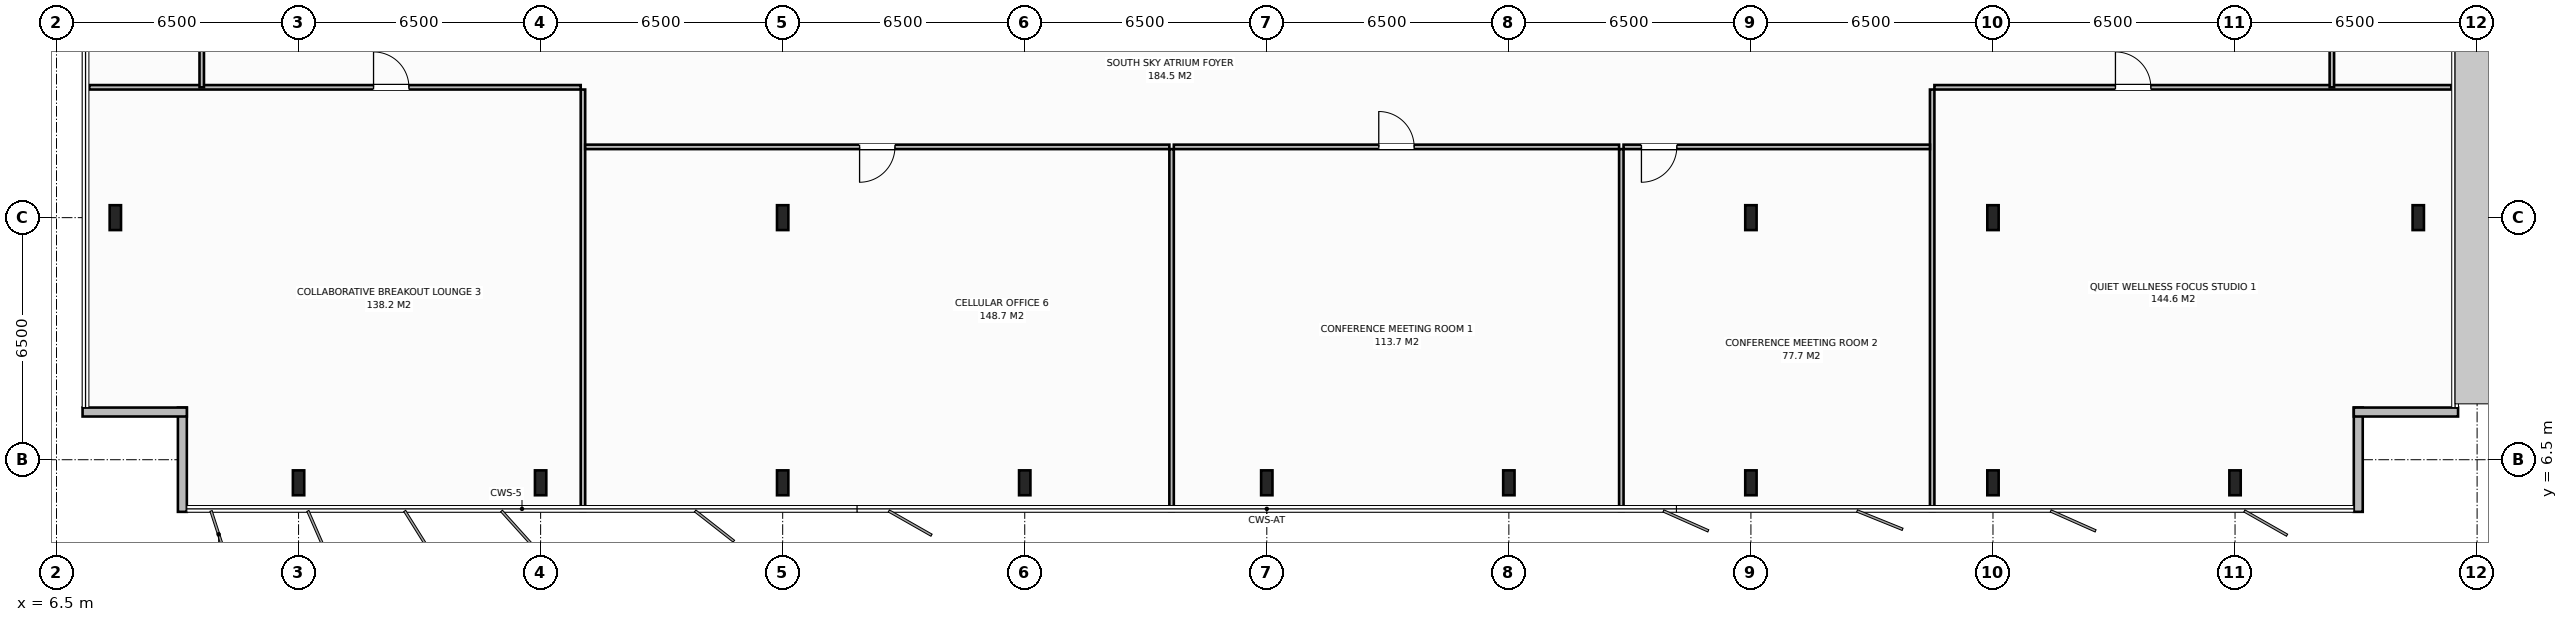
"""IFC4 building model, lengths in metres.
Left out: names, types, materials, properties, quantities, classifications, styles, units other than length and angle.
Written with IfcOpenShell. Run it as: python <this file> out.ifc"""

import sys

from ifc_helpers import new_model, si_unit, direction, frame, frame_2d, origin, origin_2d, place, context, subcontext, project, spatial, rectangle, i_section, extrude, element, fill, save


model = new_model("IFC4")
c1 = context("Model", 3, precision=1e-05, world=origin(), true_north=direction((0.0, 1.0)))
c2 = subcontext(c1, "Body", "Model", "MODEL_VIEW")
j1 = project(units=[si_unit("LENGTHUNIT", "METRE"), si_unit("PLANEANGLEUNIT", "RADIAN")], contexts=[c1])
p1 = place(None, origin())
s1 = spatial("IfcSite", under=j1, at=p1, CompositionType="ELEMENT")
p2 = place(p1, origin())
s2 = spatial("IfcBuilding", under=s1, at=p2, CompositionType="ELEMENT")
p3 = place(p2, frame((0.0, 0.0, 263.2)))
s3 = spatial("IfcBuildingStorey", under=s2, at=p3, CompositionType="ELEMENT", Elevation=263.2)
for number, where, z_axis, x_axis in (
    (1, (58.5, 13.0, 0.0), (0.0, 0.0, 1.0), (1.0, 0.0, 0.0)),
    (2, (26.0, 13.0, 0.0), (0.0, 0.0, 1.0), (1.0, 0.0, 0.0)),
    (3, (52.0, 13.0, 0.0), (0.0, 0.0, 1.0), (1.0, 0.0, 0.0)),
    (4, (13.0, 5.88, 0.0), (0.0, 0.0, 1.0), (1.0, 0.0, 0.0)),
    (5, (19.5, 5.88, 0.0), (0.0, 0.0, 1.0), (1.0, 0.0, 0.0)),
    (6, (26.0, 5.88, 0.0), (0.0, 0.0, 1.0), (1.0, 0.0, 0.0)),
    (7, (32.5, 5.88, 0.0), (0.0, 0.0, 1.0), (1.0, 0.0, 0.0)),
    (8, (39.0, 5.88, 0.0), (0.0, 0.0, 1.0), (1.0, 0.0, 0.0)),
    (9, (45.5, 5.88, 0.0), (0.0, 0.0, 1.0), (1.0, 0.0, 0.0)),
    (10, (52.0, 5.88, 0.0), (0.0, 0.0, 1.0), (1.0, 0.0, 0.0)),
    (11, (58.5, 5.88, 0.0), (0.0, 0.0, 1.0), (1.0, 0.0, 0.0)),
    (12, (65.0, 5.88, 0.0), (0.0, 0.0, 1.0), (1.0, 0.0, 0.0)),
    (13, (8.08, 13.0, 0.0), (0.0, 0.0, 1.0), (1.0, 0.0, 0.0)),
    (14, (69.92, 13.0, 0.0), (0.0, 0.0, 1.0), (1.0, 0.0, 0.0)),
):
    element("IfcColumn", number, at=place(p3, frame(where, z_axis=z_axis, x_axis=x_axis)), inside=s3, PredefinedType="COLUMN", context=c2, shape_type="SweptSolid", body=[
        extrude(i_section(OverallWidth=0.305, OverallDepth=0.668, WebThickness=0.021, FlangeThickness=0.04, at=origin_2d()), origin(), (0.0, 0.0, 1.0), 3.8),
    ])
p4 = place(p3, frame((9.88, 5.1, 0.0), z_axis=(0.0, 0.0, 1.0), x_axis=(0.0, 1.0, 0.0)))
e15 = element("IfcWall", 15, at=p4, inside=s3, PredefinedType="STANDARD", context=c2, shape_type="SweptSolid", body=[
    extrude(rectangle(XDim=2.8, YDim=0.24, at=frame_2d((1.4, 0.0))), origin(), (0.0, 0.0, 1.0), 3.588),
])
p5 = place(p3, frame((10.0, 7.78, 0.0), z_axis=(0.0, 0.0, 1.0), x_axis=(-1.0, 0.0, 0.0)))
e16 = element("IfcWall", 16, at=p5, inside=s3, PredefinedType="STANDARD", context=c2, shape_type="SweptSolid", body=[
    extrude(rectangle(XDim=2.8, YDim=0.24, at=frame_2d((1.4, 0.0))), origin(), (0.0, 0.0, 1.0), 3.588),
])
p6 = place(p3, frame((68.309, 7.9, 0.0), z_axis=(0.0, 0.0, 1.0), x_axis=(0.0, -1.0, 0.0)))
e17 = element("IfcWall", 17, at=p6, inside=s3, PredefinedType="STANDARD", context=c2, shape_type="SweptSolid", body=[
    extrude(rectangle(XDim=2.8, YDim=0.24, at=frame_2d((1.4, 0.0))), origin(), (0.0, 0.0, 1.0), 3.588),
])
p7 = place(p3, frame((70.989, 7.78, 0.0), z_axis=(0.0, 0.0, 1.0), x_axis=(-1.0, 0.0, 0.0)))
e18 = element("IfcWall", 18, at=p7, inside=s3, PredefinedType="STANDARD", context=c2, shape_type="SweptSolid", body=[
    extrude(rectangle(XDim=2.8, YDim=0.24, at=frame_2d((1.4, 0.0))), origin(), (0.0, 0.0, 1.0), 3.588),
])
p8 = place(p3, frame((20.637, 5.12, 0.0), z_axis=(0.0, 0.0, 1.0), x_axis=(0.0, 1.0, 0.0)))
e19 = element("IfcWall", 19, at=p8, inside=s3, PredefinedType="PARTITIONING", context=c2, shape_type="SweptSolid", body=[
    extrude(rectangle(XDim=11.32, YDim=0.12, at=frame_2d((5.66, 0.0))), origin(), (0.0, 0.0, 1.0), 3.588),
])
p9 = place(p3, frame((7.38, 16.5, 0.0), z_axis=(0.0, 0.0, 1.0), x_axis=(1.0, 0.0, 0.0)))
e20 = element("IfcWall", 20, at=p9, inside=s3, PredefinedType="PARTITIONING", context=c2, shape_type="SweptSolid", body=[
    extrude(rectangle(XDim=13.197, YDim=0.12, at=frame_2d((6.598, 0.0))), origin(), (0.0, 0.0, 1.0), 3.588),
])
p10 = place(p9, frame((7.633, 0.0, 0.0)))
e21 = element("IfcOpeningElement", 21, at=p10, cuts=e20, PredefinedType="OPENING", context=c2, shape_type="SweptSolid", body=[
    extrude(rectangle(XDim=0.95, YDim=2.15, at=frame_2d((0.475, 1.075))), frame((0.0, 0.07, 0.0), z_axis=(0.0, -1.0, 0.0), x_axis=(1.0, 0.0, 0.0)), (0.0, 0.0, 1.0), 0.14),
])
p11 = place(p3, frame((36.443, 5.12, 0.0), z_axis=(0.0, 0.0, 1.0), x_axis=(0.0, 1.0, 0.0)))
e22 = element("IfcWall", 22, at=p11, inside=s3, PredefinedType="PARTITIONING", context=c2, shape_type="SweptSolid", body=[
    extrude(rectangle(XDim=9.72, YDim=0.12, at=frame_2d((4.86, 0.0))), origin(), (0.0, 0.0, 1.0), 3.588),
])
p12 = place(p3, frame((20.697, 14.9, 0.0), z_axis=(0.0, 0.0, 1.0), x_axis=(1.0, 0.0, 0.0)))
e23 = element("IfcWall", 23, at=p12, inside=s3, PredefinedType="PARTITIONING", context=c2, shape_type="SweptSolid", body=[
    extrude(rectangle(XDim=15.687, YDim=0.12, at=frame_2d((7.843, 0.0))), origin(), (0.0, 0.0, 1.0), 3.588),
])
p13 = place(p12, frame((7.368, 0.0, 0.0)))
e24 = element("IfcOpeningElement", 24, at=p13, cuts=e23, PredefinedType="OPENING", context=c2, shape_type="SweptSolid", body=[
    extrude(rectangle(XDim=0.95, YDim=2.15, at=frame_2d((0.475, 1.075))), frame((0.0, 0.07, 0.0), z_axis=(0.0, -1.0, 0.0), x_axis=(1.0, 0.0, 0.0)), (0.0, 0.0, 1.0), 0.14),
])
p14 = place(p3, frame((48.52, 5.12, 0.0), z_axis=(0.0, 0.0, 1.0), x_axis=(0.0, 1.0, 0.0)))
e25 = element("IfcWall", 25, at=p14, inside=s3, PredefinedType="PARTITIONING", context=c2, shape_type="SweptSolid", body=[
    extrude(rectangle(XDim=9.72, YDim=0.12, at=frame_2d((4.86, 0.0))), origin(), (0.0, 0.0, 1.0), 3.588),
])
p15 = place(p3, frame((36.503, 14.9, 0.0), z_axis=(0.0, 0.0, 1.0), x_axis=(1.0, 0.0, 0.0)))
e26 = element("IfcWall", 26, at=p15, inside=s3, PredefinedType="PARTITIONING", context=c2, shape_type="SweptSolid", body=[
    extrude(rectangle(XDim=11.957, YDim=0.12, at=frame_2d((5.979, 0.0))), origin(), (0.0, 0.0, 1.0), 3.588),
])
p16 = place(p15, frame((5.503, 0.0, 0.0)))
e27 = element("IfcOpeningElement", 27, at=p16, cuts=e26, PredefinedType="OPENING", context=c2, shape_type="SweptSolid", body=[
    extrude(rectangle(XDim=0.95, YDim=2.15, at=frame_2d((0.475, 1.075))), frame((0.0, 0.07, 0.0), z_axis=(0.0, -1.0, 0.0), x_axis=(1.0, 0.0, 0.0)), (0.0, 0.0, 1.0), 0.14),
])
p17 = place(p3, frame((56.867, 5.12, 0.0), z_axis=(0.0, 0.0, 1.0), x_axis=(0.0, 1.0, 0.0)))
e28 = element("IfcWall", 28, at=p17, inside=s3, PredefinedType="PARTITIONING", context=c2, shape_type="SweptSolid", body=[
    extrude(rectangle(XDim=11.32, YDim=0.12, at=frame_2d((5.66, 0.0))), origin(), (0.0, 0.0, 1.0), 3.588),
])
p18 = place(p3, frame((48.58, 14.9, 0.0), z_axis=(0.0, 0.0, 1.0), x_axis=(1.0, 0.0, 0.0)))
e29 = element("IfcWall", 29, at=p18, inside=s3, PredefinedType="PARTITIONING", context=c2, shape_type="SweptSolid", body=[
    extrude(rectangle(XDim=8.227, YDim=0.12, at=frame_2d((4.114, 0.0))), origin(), (0.0, 0.0, 1.0), 3.588),
])
p19 = place(p18, frame((0.48, 0.0, 0.0)))
e30 = element("IfcOpeningElement", 30, at=p19, cuts=e29, PredefinedType="OPENING", context=c2, shape_type="SweptSolid", body=[
    extrude(rectangle(XDim=0.95, YDim=2.15, at=frame_2d((0.475, 1.075))), frame((0.0, 0.07, 0.0), z_axis=(0.0, -1.0, 0.0), x_axis=(1.0, 0.0, 0.0)), (0.0, 0.0, 1.0), 0.14),
])
p20 = place(p3, frame((56.927, 16.5, 0.0), z_axis=(0.0, 0.0, 1.0), x_axis=(1.0, 0.0, 0.0)))
e31 = element("IfcWall", 31, at=p20, inside=s3, PredefinedType="PARTITIONING", context=c2, shape_type="SweptSolid", body=[
    extrude(rectangle(XDim=13.882, YDim=0.12, at=frame_2d((6.941, 0.0))), origin(), (0.0, 0.0, 1.0), 3.588),
])
p21 = place(p20, frame((4.861, 0.0, 0.0)))
e32 = element("IfcOpeningElement", 32, at=p21, cuts=e31, PredefinedType="OPENING", context=c2, shape_type="SweptSolid", body=[
    extrude(rectangle(XDim=0.95, YDim=2.15, at=frame_2d((0.475, 1.075))), frame((0.0, 0.07, 0.0), z_axis=(0.0, -1.0, 0.0), x_axis=(1.0, 0.0, 0.0)), (0.0, 0.0, 1.0), 0.14),
])
p22 = place(p3, frame((10.4, 16.5, 0.0), z_axis=(0.0, 0.0, 1.0), x_axis=(0.0, 1.0, 0.0)))
e33 = element("IfcWall", 33, at=p22, inside=s3, PredefinedType="PARTITIONING", context=c2, shape_type="SweptSolid", body=[
    extrude(rectangle(XDim=6.333, YDim=0.12, at=frame_2d((3.167, 0.0))), origin(), (0.0, 0.0, 1.0), 3.588),
])
p23 = place(p22, frame((3.742, 0.0, 0.0)))
e34 = element("IfcOpeningElement", 34, at=p23, cuts=e33, PredefinedType="OPENING", context=c2, shape_type="SweptSolid", body=[
    extrude(rectangle(XDim=0.95, YDim=2.15, at=frame_2d((0.475, 1.075))), frame((0.0, 0.07, 0.0), z_axis=(0.0, -1.0, 0.0), x_axis=(1.0, 0.0, 0.0)), (0.0, 0.0, 1.0), 0.14),
])
p24 = place(p3, frame((67.6, 16.5, 0.0), z_axis=(0.0, 0.0, 1.0), x_axis=(0.0, 1.0, 0.0)))
e35 = element("IfcWall", 35, at=p24, inside=s3, PredefinedType="PARTITIONING", context=c2, shape_type="SweptSolid", body=[
    extrude(rectangle(XDim=19.0, YDim=0.12, at=frame_2d((9.5, 0.0))), origin(), (0.0, 0.0, 1.0), 3.588),
])
p25 = place(p24, frame((9.025, 0.0, 0.0)))
e36 = element("IfcOpeningElement", 36, at=p25, cuts=e35, PredefinedType="OPENING", context=c2, shape_type="SweptSolid", body=[
    extrude(rectangle(XDim=0.95, YDim=2.15, at=frame_2d((0.475, 1.075))), frame((0.0, 0.07, 0.0), z_axis=(0.0, -1.0, 0.0), x_axis=(1.0, 0.0, 0.0)), (0.0, 0.0, 1.0), 0.14),
])
p26 = place(p10, origin())
e37 = element("IfcDoor", 37, at=p26, inside=s3, OperationType="SINGLE_SWING_LEFT", PredefinedType="DOOR", context=c2, shape_type="SweptSolid", body=[
    extrude(rectangle(XDim=0.95, YDim=2.15, at=frame_2d((0.475, 1.075))), frame((0.0, 0.025, 0.0), z_axis=(0.0, -1.0, 0.0), x_axis=(1.0, 0.0, 0.0)), (0.0, 0.0, 1.0), 0.05),
])
fill(e21, e37)
p27 = place(p13, origin())
e38 = element("IfcDoor", 38, at=p27, inside=s3, OperationType="SINGLE_SWING_RIGHT", PredefinedType="DOOR", context=c2, shape_type="SweptSolid", body=[
    extrude(rectangle(XDim=0.95, YDim=2.15, at=frame_2d((0.475, 1.075))), frame((0.0, 0.025, 0.0), z_axis=(0.0, -1.0, 0.0), x_axis=(1.0, 0.0, 0.0)), (0.0, 0.0, 1.0), 0.05),
])
fill(e24, e38)
p28 = place(p16, origin())
e39 = element("IfcDoor", 39, at=p28, inside=s3, OperationType="SINGLE_SWING_LEFT", PredefinedType="DOOR", context=c2, shape_type="SweptSolid", body=[
    extrude(rectangle(XDim=0.95, YDim=2.15, at=frame_2d((0.475, 1.075))), frame((0.0, 0.025, 0.0), z_axis=(0.0, -1.0, 0.0), x_axis=(1.0, 0.0, 0.0)), (0.0, 0.0, 1.0), 0.05),
])
fill(e27, e39)
p29 = place(p19, origin())
e40 = element("IfcDoor", 40, at=p29, inside=s3, OperationType="SINGLE_SWING_RIGHT", PredefinedType="DOOR", context=c2, shape_type="SweptSolid", body=[
    extrude(rectangle(XDim=0.95, YDim=2.15, at=frame_2d((0.475, 1.075))), frame((0.0, 0.025, 0.0), z_axis=(0.0, -1.0, 0.0), x_axis=(1.0, 0.0, 0.0)), (0.0, 0.0, 1.0), 0.05),
])
fill(e30, e40)
p30 = place(p21, origin())
e41 = element("IfcDoor", 41, at=p30, inside=s3, OperationType="SINGLE_SWING_LEFT", PredefinedType="DOOR", context=c2, shape_type="SweptSolid", body=[
    extrude(rectangle(XDim=0.95, YDim=2.15, at=frame_2d((0.475, 1.075))), frame((0.0, 0.025, 0.0), z_axis=(0.0, -1.0, 0.0), x_axis=(1.0, 0.0, 0.0)), (0.0, 0.0, 1.0), 0.05),
])
fill(e32, e41)
save(model, sys.argv[1])
